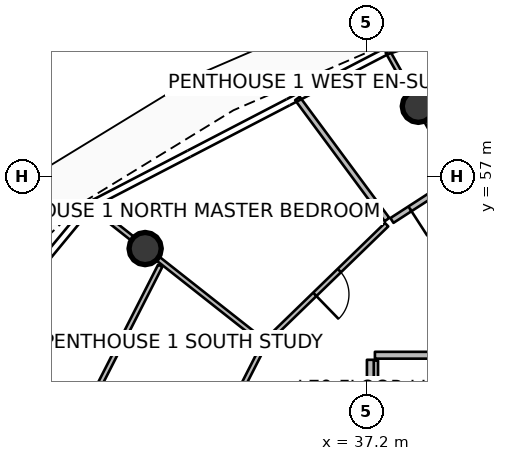
"""IFC4 building model, lengths in metres.
Left out: names, types, materials, properties, quantities, classifications, styles, units other than length and angle.
Written with IfcOpenShell. Run it as: python <this file> out.ifc"""

import sys

from ifc_helpers import new_model, si_unit, direction, frame, frame_2d, origin, origin_2d, place, context, subcontext, project, spatial, rectangle, circle, extrude, element, fill, save


model = new_model("IFC4")
c1 = context("Model", 3, precision=1e-05, world=origin(), true_north=direction((0.0, 1.0)))
c2 = subcontext(c1, "Body", "Model", "MODEL_VIEW")
j1 = project(units=[si_unit("LENGTHUNIT", "METRE"), si_unit("PLANEANGLEUNIT", "RADIAN")], contexts=[c1])
p1 = place(None, origin())
s1 = spatial("IfcSite", under=j1, at=p1, CompositionType="ELEMENT")
p2 = place(p1, origin())
s2 = spatial("IfcBuilding", under=s1, at=p2, CompositionType="ELEMENT")
p3 = place(p2, frame((0.0, 0.0, 313.7)))
s3 = spatial("IfcBuildingStorey", under=s2, at=p3, CompositionType="ELEMENT", Elevation=313.7)
for number, where, z_axis, x_axis in (
    (1, (38.563, 58.851, 0.0), (0.0, 0.0, 1.0), (1.0, 0.0, 0.0)),
    (2, (31.374, 55.107, 0.0), (0.0, 0.0, 1.0), (1.0, 0.0, 0.0)),
):
    element("IfcColumn", number, at=place(p3, frame(where, z_axis=z_axis, x_axis=x_axis)), inside=s3, PredefinedType="COLUMN", context=c2, shape_type="SweptSolid", body=[
        extrude(circle(Radius=0.425, at=origin_2d()), origin(), (0.0, 0.0, 1.0), 3.94),
    ])
p4 = place(p3, frame((37.44, 50.62, 0.0), z_axis=(0.0, 0.0, 1.0), x_axis=(0.0, 1.0, 0.0)))
e3 = element("IfcWall", 3, at=p4, inside=s3, PredefinedType="PARTITIONING", context=c2, shape_type="SweptSolid", body=[
    extrude(rectangle(XDim=1.54, YDim=0.125, at=frame_2d((0.77, 0.0))), origin(), (0.0, 0.0, 1.0), 3.38),
])
p5 = place(p3, frame((42.112, 52.3, 0.0), z_axis=(0.0, 0.0, 1.0), x_axis=(-1.0, 0.0, 0.0)))
e4 = element("IfcWall", 4, at=p5, inside=s3, PredefinedType="PARTITIONING", context=c2, shape_type="SweptSolid", body=[
    extrude(rectangle(XDim=4.692, YDim=0.18, at=frame_2d((2.346, 0.0))), origin(), (0.0, 0.0, 1.0), 3.38),
])
p6 = place(p3, frame((37.3, 52.18, 0.0), z_axis=(0.0, 0.0, 1.0), x_axis=(0.0, -1.0, 0.0)))
e5 = element("IfcWall", 5, at=p6, inside=s3, PredefinedType="PARTITIONING", context=c2, shape_type="SweptSolid", body=[
    extrude(rectangle(XDim=1.625, YDim=0.18, at=frame_2d((0.812, 0.0))), origin(), (0.0, 0.0, 1.0), 3.38),
])
p7 = place(p3, frame((39.565, 57.062, 0.0), z_axis=(0.0, 0.0, 1.0), x_axis=(-0.488615426152, 0.872499263797, 0.0)))
e6 = element("IfcWall", 6, at=p7, inside=s3, PredefinedType="PARTITIONING", context=c2, shape_type="SweptSolid", body=[
    extrude(rectangle(XDim=3.699, YDim=0.125, at=frame_2d((1.85, 0.0))), origin(), (0.0, 0.0, 1.0), 3.38),
])
p8 = place(p3, frame((39.53, 56.92, 0.0), z_axis=(0.0, 0.0, 1.0), x_axis=(-0.839824942878, -0.542857315802, 0.0)))
e7 = element("IfcWall", 7, at=p8, inside=s3, PredefinedType="PARTITIONING", context=c2, shape_type="SweptSolid", body=[
    extrude(rectangle(XDim=1.979, YDim=0.15, at=frame_2d((0.989, 0.0))), origin(), (0.0, 0.0, 1.0), 3.38),
])
p9 = place(p8, frame((0.564, 0.0, 0.0)))
e8 = element("IfcOpeningElement", 8, at=p9, cuts=e7, PredefinedType="OPENING", context=c2, shape_type="SweptSolid", body=[
    extrude(rectangle(XDim=0.85, YDim=2.06, at=frame_2d((0.425, 1.03))), frame((0.0, 0.085, 0.0), z_axis=(0.0, -1.0, 0.0), x_axis=(1.0, 0.0, 0.0)), (0.0, 0.0, 1.0), 0.17),
])
p10 = place(p3, frame((37.739, 55.87, 0.0), z_axis=(0.0, 0.0, 1.0), x_axis=(-0.594773749171, 0.803893144203, 0.0)))
e9 = element("IfcWall", 9, at=p10, inside=s3, PredefinedType="PARTITIONING", context=c2, shape_type="SweptSolid", body=[
    extrude(rectangle(XDim=3.964, YDim=0.15, at=frame_2d((1.982, 0.0))), origin(), (0.0, 0.0, 1.0), 3.38),
])
p11 = place(p3, frame((37.728, 55.735, 0.0), z_axis=(0.0, 0.0, 1.0), x_axis=(-0.717843655189, -0.696204342636, 0.0)))
e10 = element("IfcWall", 10, at=p11, inside=s3, PredefinedType="PARTITIONING", context=c2, shape_type="SweptSolid", body=[
    extrude(rectangle(XDim=4.366, YDim=0.125, at=frame_2d((2.183, 0.0))), origin(), (0.0, 0.0, 1.0), 3.38),
])
p12 = place(p11, frame((1.733, 0.0, 0.0)))
e11 = element("IfcOpeningElement", 11, at=p12, cuts=e10, PredefinedType="OPENING", context=c2, shape_type="SweptSolid", body=[
    extrude(rectangle(XDim=0.9, YDim=2.08, at=frame_2d((0.45, 1.04))), frame((0.0, 0.073, 0.0), z_axis=(0.0, -1.0, 0.0), x_axis=(1.0, 0.0, 0.0)), (0.0, 0.0, 1.0), 0.145),
])
p13 = place(p3, frame((34.443, 52.688, 0.0), z_axis=(0.0, 0.0, 1.0), x_axis=(-0.785329715116, 0.61907773224, 0.0)))
e12 = element("IfcWall", 12, at=p13, inside=s3, PredefinedType="PARTITIONING", context=c2, shape_type="SweptSolid", body=[
    extrude(rectangle(XDim=5.73, YDim=0.125, at=frame_2d((2.865, 0.0))), origin(), (0.0, 0.0, 1.0), 3.38),
])
p14 = place(p3, frame((34.472, 52.528, 0.0), z_axis=(0.0, 0.0, 1.0), x_axis=(-0.453985634683, -0.891009003042, 0.0)))
e13 = element("IfcWall", 13, at=p14, inside=s3, PredefinedType="PARTITIONING", context=c2, shape_type="SweptSolid", body=[
    extrude(rectangle(XDim=6.477, YDim=0.125, at=frame_2d((3.238, 0.0))), origin(), (0.0, 0.0, 1.0), 3.38),
])
p15 = place(p14, frame((2.788, 0.0, 0.0)))
e14 = element("IfcOpeningElement", 14, at=p15, cuts=e13, PredefinedType="OPENING", context=c2, shape_type="SweptSolid", body=[
    extrude(rectangle(XDim=0.9, YDim=2.08, at=frame_2d((0.45, 1.04))), frame((0.0, 0.073, 0.0), z_axis=(0.0, -1.0, 0.0), x_axis=(1.0, 0.0, 0.0)), (0.0, 0.0, 1.0), 0.145),
])
p16 = place(p3, frame((31.772, 54.656, 0.0), z_axis=(0.0, 0.0, 1.0), x_axis=(-0.453983318952, -0.891010182946, 0.0)))
e15 = element("IfcWall", 15, at=p16, inside=s3, PredefinedType="PARTITIONING", context=c2, shape_type="SweptSolid", body=[
    extrude(rectangle(XDim=7.818, YDim=0.125, at=frame_2d((3.909, 0.0))), origin(), (0.0, 0.0, 1.0), 3.38),
])
p17 = place(p16, frame((3.459, 0.0, 0.0)))
e16 = element("IfcOpeningElement", 16, at=p17, cuts=e15, PredefinedType="OPENING", context=c2, shape_type="SweptSolid", body=[
    extrude(rectangle(XDim=0.9, YDim=2.08, at=frame_2d((0.45, 1.04))), frame((0.0, 0.073, 0.0), z_axis=(0.0, -1.0, 0.0), x_axis=(1.0, 0.0, 0.0)), (0.0, 0.0, 1.0), 0.145),
])
p18 = place(p9, origin())
e17 = element("IfcDoor", 17, at=p18, inside=s3, OperationType="SINGLE_SWING_RIGHT", PredefinedType="DOOR", context=c2, shape_type="SweptSolid", body=[
    extrude(rectangle(XDim=0.85, YDim=2.06, at=frame_2d((0.425, 1.03))), frame((0.0, 0.025, 0.0), z_axis=(0.0, -1.0, 0.0), x_axis=(1.0, 0.0, 0.0)), (0.0, 0.0, 1.0), 0.05),
])
fill(e8, e17)
p19 = place(p12, origin())
e18 = element("IfcDoor", 18, at=p19, inside=s3, OperationType="SINGLE_SWING_RIGHT", PredefinedType="DOOR", context=c2, shape_type="SweptSolid", body=[
    extrude(rectangle(XDim=0.9, YDim=2.08, at=frame_2d((0.45, 1.04))), frame((0.0, 0.025, 0.0), z_axis=(0.0, -1.0, 0.0), x_axis=(1.0, 0.0, 0.0)), (0.0, 0.0, 1.0), 0.05),
])
fill(e11, e18)
save(model, sys.argv[1])
